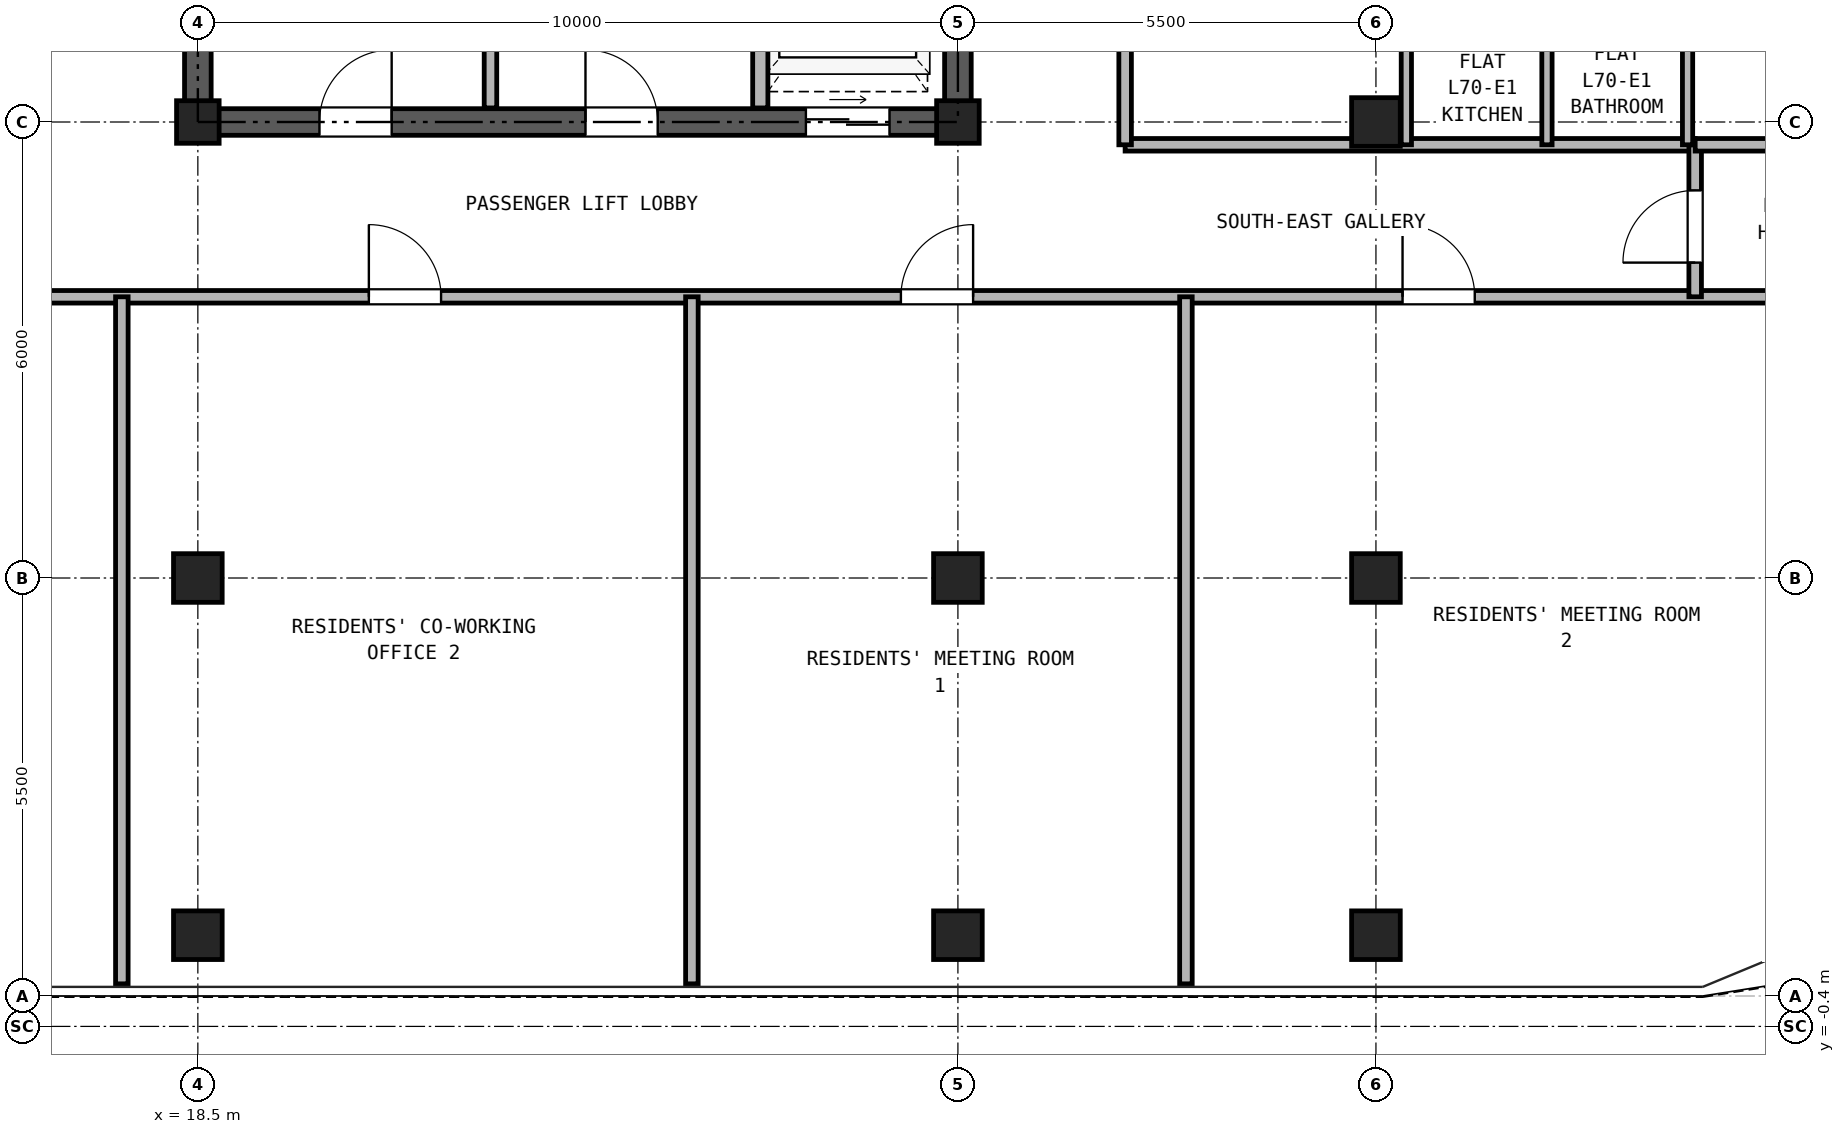
"""IFC4 building model, lengths in metres.
Left out: names, types, materials, properties, quantities, classifications, styles, units other than length and angle.
Written with IfcOpenShell. Run it as: python <this file> out.ifc"""

import sys

from ifc_helpers import new_model, si_unit, direction, frame, frame_2d, origin, origin_2d, place, context, subcontext, project, spatial, rectangle, hollow_rectangle, extrude, source, transform, mapped, element, fill, save


model = new_model("IFC4")
c1 = context("Model", 3, precision=1e-05, world=origin(), true_north=direction((0.0, 1.0)))
c2 = subcontext(c1, "Body", "Model", "MODEL_VIEW")
j1 = project(units=[si_unit("LENGTHUNIT", "METRE"), si_unit("PLANEANGLEUNIT", "RADIAN")], contexts=[c1])
p1 = place(None, origin())
s1 = spatial("IfcSite", under=j1, at=p1, CompositionType="ELEMENT")
p2 = place(p1, origin())
s2 = spatial("IfcBuilding", under=s1, at=p2, CompositionType="ELEMENT")
p3 = place(p2, frame((0.0, 0.0, 245.7)))
s3 = spatial("IfcBuildingStorey", under=s2, at=p3, CompositionType="ELEMENT", Elevation=245.7)
m1 = source(origin(), c2, "Body", "SweptSolid", [
    extrude(hollow_rectangle(XDim=0.64, YDim=0.64, WallThickness=0.035, at=origin_2d()), origin(), (0.0, 0.0, 1.0), 2.98),
])
for number, where, z_axis, x_axis in (
    (1, (18.5, 0.8, 0.0), (0.0, 0.0, 1.0), (1.0, 0.0, 0.0)),
    (2, (28.5, 0.8, 0.0), (0.0, 0.0, 1.0), (1.0, 0.0, 0.0)),
    (3, (34.0, 0.8, 0.0), (0.0, 0.0, 1.0), (1.0, 0.0, 0.0)),
    (4, (18.5, 5.5, 0.0), (0.0, 0.0, 1.0), (1.0, 0.0, 0.0)),
):
    element("IfcColumn", number, at=place(p3, frame(where, z_axis=z_axis, x_axis=x_axis)), inside=s3, PredefinedType="COLUMN", context=c2, shape_type="MappedRepresentation", body=[
        mapped(m1, transform((0.0, 0.0, 0.0), x_axis=(1.0, 0.0, 0.0), y_axis=(0.0, 1.0, 0.0), z_axis=(0.0, 0.0, 1.0), scale=1.0)),
    ])
m2 = source(origin(), c2, "Body", "SweptSolid", [
    extrude(hollow_rectangle(XDim=0.56, YDim=0.56, WallThickness=0.03, at=origin_2d()), origin(), (0.0, 0.0, 1.0), 2.98),
])
p4 = place(p3, frame((18.5, 11.5, 0.0), z_axis=(0.0, 0.0, 1.0), x_axis=(1.0, 0.0, 0.0)))
e5 = element("IfcColumn", 5, at=p4, inside=s3, PredefinedType="COLUMN", context=c2, shape_type="MappedRepresentation", body=[
    mapped(m2, transform((0.0, 0.0, 0.0), x_axis=(1.0, 0.0, 0.0), y_axis=(0.0, 1.0, 0.0), z_axis=(0.0, 0.0, 1.0), scale=1.0)),
])
p5 = place(p3, frame((28.5, 5.5, 0.0), z_axis=(0.0, 0.0, 1.0), x_axis=(1.0, 0.0, 0.0)))
e6 = element("IfcColumn", 6, at=p5, inside=s3, PredefinedType="COLUMN", context=c2, shape_type="MappedRepresentation", body=[
    mapped(m1, transform((0.0, 0.0, 0.0), x_axis=(1.0, 0.0, 0.0), y_axis=(0.0, 1.0, 0.0), z_axis=(0.0, 0.0, 1.0), scale=1.0)),
])
p6 = place(p3, frame((28.5, 11.5, 0.0), z_axis=(0.0, 0.0, 1.0), x_axis=(1.0, 0.0, 0.0)))
e7 = element("IfcColumn", 7, at=p6, inside=s3, PredefinedType="COLUMN", context=c2, shape_type="MappedRepresentation", body=[
    mapped(m2, transform((0.0, 0.0, 0.0), x_axis=(1.0, 0.0, 0.0), y_axis=(0.0, 1.0, 0.0), z_axis=(0.0, 0.0, 1.0), scale=1.0)),
])
for number, where, z_axis, x_axis in (
    (8, (34.0, 5.5, 0.0), (0.0, 0.0, 1.0), (1.0, 0.0, 0.0)),
    (9, (34.0, 11.5, 0.0), (0.0, 0.0, 1.0), (1.0, 0.0, 0.0)),
):
    element("IfcColumn", number, at=place(p3, frame(where, z_axis=z_axis, x_axis=x_axis)), inside=s3, PredefinedType="COLUMN", context=c2, shape_type="MappedRepresentation", body=[
        mapped(m1, transform((0.0, 0.0, 0.0), x_axis=(1.0, 0.0, 0.0), y_axis=(0.0, 1.0, 0.0), z_axis=(0.0, 0.0, 1.0), scale=1.0)),
    ])
p7 = place(p3, frame((18.325, 11.5, 0.0), z_axis=(0.0, 0.0, 1.0), x_axis=(1.0, 0.0, 0.0)))
e10 = element("IfcWall", 10, at=p7, inside=s3, PredefinedType="SHEAR", context=c2, shape_type="SweptSolid", body=[
    extrude(rectangle(XDim=10.35, YDim=0.35, at=frame_2d((5.175, 0.0))), origin(), (0.0, 0.0, 1.0), 2.98),
])
p8 = place(p7, frame((1.775, 0.0, 0.0)))
e11 = element("IfcOpeningElement", 11, at=p8, cuts=e10, PredefinedType="OPENING", context=c2, shape_type="SweptSolid", body=[
    extrude(rectangle(XDim=0.95, YDim=2.15, at=frame_2d((0.475, 1.075))), frame((0.0, 0.185, 0.0), z_axis=(0.0, -1.0, 0.0), x_axis=(1.0, 0.0, 0.0)), (0.0, 0.0, 1.0), 0.37),
])
p9 = place(p7, frame((5.275, 0.0, 0.0)))
e12 = element("IfcOpeningElement", 12, at=p9, cuts=e10, PredefinedType="OPENING", context=c2, shape_type="SweptSolid", body=[
    extrude(rectangle(XDim=0.95, YDim=2.15, at=frame_2d((0.475, 1.075))), frame((0.0, 0.185, 0.0), z_axis=(0.0, -1.0, 0.0), x_axis=(1.0, 0.0, 0.0)), (0.0, 0.0, 1.0), 0.37),
])
p10 = place(p7, frame((8.175, 0.0, 0.0)))
e13 = element("IfcOpeningElement", 13, at=p10, cuts=e10, PredefinedType="OPENING", context=c2, shape_type="SweptSolid", body=[
    extrude(rectangle(XDim=1.1, YDim=2.25, at=frame_2d((0.55, 1.125))), frame((0.0, 0.185, 0.0), z_axis=(0.0, -1.0, 0.0), x_axis=(1.0, 0.0, 0.0)), (0.0, 0.0, 1.0), 0.37),
])
p11 = place(p3, frame((18.5, 11.675, 0.0), z_axis=(0.0, 0.0, 1.0), x_axis=(0.0, 1.0, 0.0)))
e14 = element("IfcWall", 14, at=p11, inside=s3, PredefinedType="SHEAR", context=c2, shape_type="SweptSolid", body=[
    extrude(rectangle(XDim=16.9, YDim=0.35, at=frame_2d((8.45, 0.0))), origin(), (0.0, 0.0, 1.0), 2.98),
])
p12 = place(p11, frame((7.475, 0.0, 0.0)))
e15 = element("IfcOpeningElement", 15, at=p12, cuts=e14, PredefinedType="OPENING", context=c2, shape_type="SweptSolid", body=[
    extrude(rectangle(XDim=1.15, YDim=2.2, at=frame_2d((0.575, 1.1))), frame((0.0, 0.185, 0.0), z_axis=(0.0, -1.0, 0.0), x_axis=(1.0, 0.0, 0.0)), (0.0, 0.0, 1.0), 0.37),
])
p13 = place(p3, frame((28.5, 11.675, 0.0), z_axis=(0.0, 0.0, 1.0), x_axis=(0.0, 1.0, 0.0)))
e16 = element("IfcWall", 16, at=p13, inside=s3, PredefinedType="SHEAR", context=c2, shape_type="SweptSolid", body=[
    extrude(rectangle(XDim=16.9, YDim=0.35, at=frame_2d((8.45, 0.0))), origin(), (0.0, 0.0, 1.0), 2.98),
])
p14 = place(p13, frame((7.475, 0.0, 0.0)))
e17 = element("IfcOpeningElement", 17, at=p14, cuts=e16, PredefinedType="OPENING", context=c2, shape_type="SweptSolid", body=[
    extrude(rectangle(XDim=1.15, YDim=2.2, at=frame_2d((0.575, 1.1))), frame((0.0, 0.185, 0.0), z_axis=(0.0, -1.0, 0.0), x_axis=(1.0, 0.0, 0.0)), (0.0, 0.0, 1.0), 0.37),
])
p15 = place(p3, frame((22.35, 11.685, 0.0), z_axis=(0.0, 0.0, 1.0), x_axis=(0.0, 1.0, 0.0)))
e18 = element("IfcWall", 18, at=p15, inside=s3, PredefinedType="PARTITIONING", context=c2, shape_type="SweptSolid", body=[
    extrude(rectangle(XDim=3.315, YDim=0.165, at=frame_2d((1.657, 0.0))), origin(), (0.0, 0.0, 1.0), 2.98),
])
p16 = place(p3, frame((25.9, 11.685, 0.0), z_axis=(0.0, 0.0, 1.0), x_axis=(0.0, 1.0, 0.0)))
e19 = element("IfcWall", 19, at=p16, inside=s3, PredefinedType="PARTITIONING", context=c2, shape_type="SweptSolid", body=[
    extrude(rectangle(XDim=3.315, YDim=0.2, at=frame_2d((1.657, 0.0))), origin(), (0.0, 0.0, 1.0), 2.98),
])
p17 = place(p3, frame((5.36, 9.2, 0.0), z_axis=(0.0, 0.0, 1.0), x_axis=(1.0, 0.0, 0.0)))
e20 = element("IfcWall", 20, at=p17, inside=s3, PredefinedType="PARTITIONING", context=c2, shape_type="SweptSolid", body=[
    extrude(rectangle(XDim=36.28, YDim=0.165, at=frame_2d((18.14, 0.0))), origin(), (0.0, 0.0, 1.0), 2.98),
])
p18 = place(p17, frame((7.17, 0.0, 0.0)))
e21 = element("IfcOpeningElement", 21, at=p18, cuts=e20, PredefinedType="OPENING", context=c2, shape_type="SweptSolid", body=[
    extrude(rectangle(XDim=0.95, YDim=2.15, at=frame_2d((0.475, 1.075))), frame((0.0, 0.093, 0.0), z_axis=(0.0, -1.0, 0.0), x_axis=(1.0, 0.0, 0.0)), (0.0, 0.0, 1.0), 0.185),
])
p19 = place(p17, frame((15.39, 0.0, 0.0)))
e22 = element("IfcOpeningElement", 22, at=p19, cuts=e20, PredefinedType="OPENING", context=c2, shape_type="SweptSolid", body=[
    extrude(rectangle(XDim=0.95, YDim=2.15, at=frame_2d((0.475, 1.075))), frame((0.0, 0.093, 0.0), z_axis=(0.0, -1.0, 0.0), x_axis=(1.0, 0.0, 0.0)), (0.0, 0.0, 1.0), 0.185),
])
p20 = place(p17, frame((22.39, 0.0, 0.0)))
e23 = element("IfcOpeningElement", 23, at=p20, cuts=e20, PredefinedType="OPENING", context=c2, shape_type="SweptSolid", body=[
    extrude(rectangle(XDim=0.95, YDim=2.15, at=frame_2d((0.475, 1.075))), frame((0.0, 0.093, 0.0), z_axis=(0.0, -1.0, 0.0), x_axis=(1.0, 0.0, 0.0)), (0.0, 0.0, 1.0), 0.185),
])
p21 = place(p17, frame((28.99, 0.0, 0.0)))
e24 = element("IfcOpeningElement", 24, at=p21, cuts=e20, PredefinedType="OPENING", context=c2, shape_type="SweptSolid", body=[
    extrude(rectangle(XDim=0.95, YDim=2.15, at=frame_2d((0.475, 1.075))), frame((0.0, 0.093, 0.0), z_axis=(0.0, -1.0, 0.0), x_axis=(1.0, 0.0, 0.0)), (0.0, 0.0, 1.0), 0.185),
])
p22 = place(p3, frame((30.7, 11.2, 0.0), z_axis=(0.0, 0.0, 1.0), x_axis=(1.0, 0.0, 0.0)))
e25 = element("IfcWall", 25, at=p22, inside=s3, PredefinedType="PARTITIONING", context=c2, shape_type="SweptSolid", body=[
    extrude(rectangle(XDim=7.5, YDim=0.165, at=frame_2d((3.75, 0.0))), origin(), (0.0, 0.0, 1.0), 2.98),
])
p23 = place(p3, frame((38.2, 9.2, 0.0), z_axis=(0.0, 0.0, 1.0), x_axis=(0.0, 1.0, 0.0)))
e26 = element("IfcWall", 26, at=p23, inside=s3, PredefinedType="PARTITIONING", context=c2, shape_type="SweptSolid", body=[
    extrude(rectangle(XDim=2.0, YDim=0.165, at=frame_2d((1.0, 0.0))), origin(), (0.0, 0.0, 1.0), 2.98),
])
p24 = place(p23, frame((0.45, 0.0, 0.0)))
e27 = element("IfcOpeningElement", 27, at=p24, cuts=e26, PredefinedType="OPENING", context=c2, shape_type="SweptSolid", body=[
    extrude(rectangle(XDim=0.95, YDim=2.15, at=frame_2d((0.475, 1.075))), frame((0.0, 0.093, 0.0), z_axis=(0.0, -1.0, 0.0), x_axis=(1.0, 0.0, 0.0)), (0.0, 0.0, 1.0), 0.185),
])
p25 = place(p3, frame((30.7, 11.2, 0.0), z_axis=(0.0, 0.0, 1.0), x_axis=(0.0, 1.0, 0.0)))
e28 = element("IfcWall", 28, at=p25, inside=s3, PredefinedType="PARTITIONING", context=c2, shape_type="SweptSolid", body=[
    extrude(rectangle(XDim=23.94, YDim=0.165, at=frame_2d((11.97, 0.0))), origin(), (0.0, 0.0, 1.0), 2.98),
])
p26 = place(p25, frame((3.4, 0.0, 0.0)))
e29 = element("IfcOpeningElement", 29, at=p26, cuts=e28, PredefinedType="OPENING", context=c2, shape_type="SweptSolid", body=[
    extrude(rectangle(XDim=1.0, YDim=2.15, at=frame_2d((0.5, 1.075))), frame((0.0, 0.093, 0.0), z_axis=(0.0, -1.0, 0.0), x_axis=(1.0, 0.0, 0.0)), (0.0, 0.0, 1.0), 0.185),
])
p27 = place(p25, frame((11.4, 0.0, 0.0)))
e30 = element("IfcOpeningElement", 30, at=p27, cuts=e28, PredefinedType="OPENING", context=c2, shape_type="SweptSolid", body=[
    extrude(rectangle(XDim=1.0, YDim=2.15, at=frame_2d((0.5, 1.075))), frame((0.0, 0.093, 0.0), z_axis=(0.0, -1.0, 0.0), x_axis=(1.0, 0.0, 0.0)), (0.0, 0.0, 1.0), 0.185),
])
p28 = place(p25, frame((17.05, 0.0, 0.0)))
e31 = element("IfcOpeningElement", 31, at=p28, cuts=e28, PredefinedType="OPENING", context=c2, shape_type="SweptSolid", body=[
    extrude(rectangle(XDim=1.0, YDim=2.15, at=frame_2d((0.5, 1.075))), frame((0.0, 0.093, 0.0), z_axis=(0.0, -1.0, 0.0), x_axis=(1.0, 0.0, 0.0)), (0.0, 0.0, 1.0), 0.185),
])
for number, where, z_axis, x_axis in (
    (32, (17.5, 0.16, 0.0), (0.0, 0.0, 1.0), (0.0, 1.0, 0.0)),
    (33, (25.0, 0.16, 0.0), (0.0, 0.0, 1.0), (0.0, 1.0, 0.0)),
    (34, (31.5, 0.16, 0.0), (0.0, 0.0, 1.0), (0.0, 1.0, 0.0)),
):
    element("IfcWall", number, at=place(p3, frame(where, z_axis=z_axis, x_axis=x_axis)), inside=s3, PredefinedType="PARTITIONING", context=c2, shape_type="SweptSolid", body=[
        extrude(rectangle(XDim=9.04, YDim=0.165, at=frame_2d((4.52, 0.0))), origin(), (0.0, 0.0, 1.0), 2.98),
    ])
p29 = place(p3, frame((38.2, 11.2, 0.0), z_axis=(0.0, 0.0, 1.0), x_axis=(1.0, 0.0, 0.0)))
e35 = element("IfcWall", 35, at=p29, inside=s3, PredefinedType="PARTITIONING", context=c2, shape_type="SweptSolid", body=[
    extrude(rectangle(XDim=3.44, YDim=0.165, at=frame_2d((1.72, 0.0))), origin(), (0.0, 0.0, 1.0), 2.98),
])
for number, where, z_axis, x_axis in (
    (36, (34.4, 11.2, 0.0), (0.0, 0.0, 1.0), (0.0, 1.0, 0.0)),
    (37, (36.25, 11.2, 0.0), (0.0, 0.0, 1.0), (0.0, 1.0, 0.0)),
    (38, (38.1, 11.2, 0.0), (0.0, 0.0, 1.0), (0.0, 1.0, 0.0)),
):
    element("IfcWall", number, at=place(p3, frame(where, z_axis=z_axis, x_axis=x_axis)), inside=s3, PredefinedType="PARTITIONING", context=c2, shape_type="SweptSolid", body=[
        extrude(rectangle(XDim=2.15, YDim=0.135, at=frame_2d((1.075, 0.0))), origin(), (0.0, 0.0, 1.0), 2.98),
    ])
p30 = place(p8, frame((0.95, 0.0, 0.0), z_axis=(0.0, 0.0, 1.0), x_axis=(-1.0, 0.0, 0.0)))
e39 = element("IfcDoor", 39, at=p30, inside=s3, OperationType="SINGLE_SWING_RIGHT", PredefinedType="DOOR", context=c2, shape_type="SweptSolid", body=[
    extrude(rectangle(XDim=0.95, YDim=2.15, at=frame_2d((0.475, 1.075))), frame((0.0, 0.025, 0.0), z_axis=(0.0, -1.0, 0.0), x_axis=(1.0, 0.0, 0.0)), (0.0, 0.0, 1.0), 0.05),
])
fill(e11, e39)
p31 = place(p9, frame((0.95, 0.0, 0.0), z_axis=(0.0, 0.0, 1.0), x_axis=(-1.0, 0.0, 0.0)))
e40 = element("IfcDoor", 40, at=p31, inside=s3, OperationType="SINGLE_SWING_LEFT", PredefinedType="DOOR", context=c2, shape_type="SweptSolid", body=[
    extrude(rectangle(XDim=0.95, YDim=2.15, at=frame_2d((0.475, 1.075))), frame((0.0, 0.025, 0.0), z_axis=(0.0, -1.0, 0.0), x_axis=(1.0, 0.0, 0.0)), (0.0, 0.0, 1.0), 0.05),
])
fill(e12, e40)
p32 = place(p10, frame((1.1, 0.0, 0.0), z_axis=(0.0, 0.0, 1.0), x_axis=(-1.0, 0.0, 0.0)))
e41 = element("IfcDoor", 41, at=p32, inside=s3, OperationType="DOUBLE_DOOR_SLIDING", PredefinedType="DOOR", context=c2, shape_type="SweptSolid", body=[
    extrude(rectangle(XDim=1.1, YDim=2.25, at=frame_2d((0.55, 1.125))), frame((0.0, 0.025, 0.0), z_axis=(0.0, -1.0, 0.0), x_axis=(1.0, 0.0, 0.0)), (0.0, 0.0, 1.0), 0.05),
])
fill(e13, e41)
p33 = place(p19, frame((0.95, 0.0, 0.0), z_axis=(0.0, 0.0, 1.0), x_axis=(-1.0, 0.0, 0.0)))
e42 = element("IfcDoor", 42, at=p33, inside=s3, OperationType="SINGLE_SWING_LEFT", PredefinedType="DOOR", context=c2, shape_type="SweptSolid", body=[
    extrude(rectangle(XDim=0.95, YDim=2.15, at=frame_2d((0.475, 1.075))), frame((0.0, 0.025, 0.0), z_axis=(0.0, -1.0, 0.0), x_axis=(1.0, 0.0, 0.0)), (0.0, 0.0, 1.0), 0.05),
])
fill(e22, e42)
p34 = place(p20, frame((0.95, 0.0, 0.0), z_axis=(0.0, 0.0, 1.0), x_axis=(-1.0, 0.0, 0.0)))
e43 = element("IfcDoor", 43, at=p34, inside=s3, OperationType="SINGLE_SWING_RIGHT", PredefinedType="DOOR", context=c2, shape_type="SweptSolid", body=[
    extrude(rectangle(XDim=0.95, YDim=2.15, at=frame_2d((0.475, 1.075))), frame((0.0, 0.025, 0.0), z_axis=(0.0, -1.0, 0.0), x_axis=(1.0, 0.0, 0.0)), (0.0, 0.0, 1.0), 0.05),
])
fill(e23, e43)
p35 = place(p21, frame((0.95, 0.0, 0.0), z_axis=(0.0, 0.0, 1.0), x_axis=(-1.0, 0.0, 0.0)))
e44 = element("IfcDoor", 44, at=p35, inside=s3, OperationType="SINGLE_SWING_LEFT", PredefinedType="DOOR", context=c2, shape_type="SweptSolid", body=[
    extrude(rectangle(XDim=0.95, YDim=2.15, at=frame_2d((0.475, 1.075))), frame((0.0, 0.025, 0.0), z_axis=(0.0, -1.0, 0.0), x_axis=(1.0, 0.0, 0.0)), (0.0, 0.0, 1.0), 0.05),
])
fill(e24, e44)
p36 = place(p24, origin())
e45 = element("IfcDoor", 45, at=p36, inside=s3, OperationType="SINGLE_SWING_LEFT", PredefinedType="DOOR", context=c2, shape_type="SweptSolid", body=[
    extrude(rectangle(XDim=0.95, YDim=2.15, at=frame_2d((0.475, 1.075))), frame((0.0, 0.025, 0.0), z_axis=(0.0, -1.0, 0.0), x_axis=(1.0, 0.0, 0.0)), (0.0, 0.0, 1.0), 0.05),
])
fill(e27, e45)
save(model, sys.argv[1])
